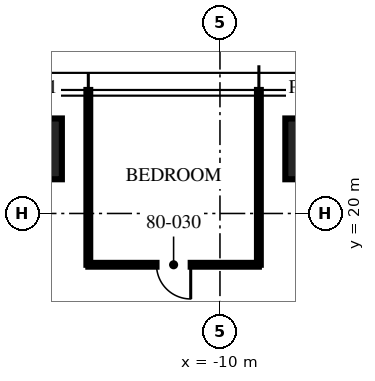
"""IFC4 building model, lengths in metres.
Left out: names, types, materials, properties, quantities, classifications, styles, units other than length and angle.
Written with IfcOpenShell. Run it as: python <this file> out.ifc"""

import sys

from ifc_helpers import new_model, si_unit, direction, frame, frame_2d, origin, origin_2d, place, context, subcontext, project, spatial, rectangle, extrude, element, fill, save


model = new_model("IFC4")
c1 = context("Model", 3, precision=1e-05, world=origin(), true_north=direction((0.0, 1.0)))
c2 = subcontext(c1, "Body", "Model", "MODEL_VIEW")
j1 = project(units=[si_unit("LENGTHUNIT", "METRE"), si_unit("PLANEANGLEUNIT", "RADIAN")], contexts=[c1])
p1 = place(None, origin())
s1 = spatial("IfcSite", under=j1, at=p1, CompositionType="ELEMENT")
p2 = place(p1, origin())
s2 = spatial("IfcBuilding", under=s1, at=p2, CompositionType="ELEMENT")
p3 = place(p2, frame((0.0, 0.0, 319.5)))
s3 = spatial("IfcBuildingStorey", under=s2, at=p3, CompositionType="ELEMENT", Elevation=319.5)
for number, where, z_axis, x_axis in (
    (1, (-14.96, 21.7, 0.0), (0.0, 0.0, 1.0), (1.0, 0.0, 0.0)),
    (2, (-7.48, 21.7, 0.0), (0.0, 0.0, 1.0), (1.0, 0.0, 0.0)),
):
    element("IfcColumn", number, at=place(p3, frame(where, z_axis=z_axis, x_axis=x_axis)), inside=s3, PredefinedType="COLUMN", context=c2, shape_type="SweptSolid", body=[
        extrude(rectangle(XDim=1.6, YDim=1.6, at=origin_2d()), origin(), (0.0, 0.0, 1.0), 3.75),
    ])
for number, where, z_axis, x_axis in (
    (3, (-8.976, 18.65, 0.0), (0.0, 0.0, 1.0), (0.0, 1.0, 0.0)),
    (4, (-13.464, 18.65, 0.0), (0.0, 0.0, 1.0), (0.0, 1.0, 0.0)),
):
    element("IfcWall", number, at=place(p3, frame(where, z_axis=z_axis, x_axis=x_axis)), inside=s3, PredefinedType="PARTITIONING", context=c2, shape_type="SweptSolid", body=[
        extrude(rectangle(XDim=4.6, YDim=0.1, at=frame_2d((2.3, 0.0))), origin(), (0.0, 0.0, 1.0), 3.01),
    ])
p4 = place(p3, frame((-8.976, 18.65, 0.0), z_axis=(0.0, 0.0, 1.0), x_axis=(-1.0, 0.0, 0.0)))
e5 = element("IfcWall", 5, at=p4, inside=s3, PredefinedType="PARTITIONING", context=c2, shape_type="SweptSolid", body=[
    extrude(rectangle(XDim=4.488, YDim=0.1, at=frame_2d((2.244, 0.0))), origin(), (0.0, 0.0, 1.0), 2.91),
])
p5 = place(p4, frame((1.794, 0.0, 0.0)))
e6 = element("IfcOpeningElement", 6, at=p5, cuts=e5, PredefinedType="OPENING", context=c2, shape_type="SweptSolid", body=[
    extrude(rectangle(XDim=0.9, YDim=2.1, at=frame_2d((0.45, 1.05))), frame((0.0, 0.06, 0.0), z_axis=(0.0, -1.0, 0.0), x_axis=(1.0, 0.0, 0.0)), (0.0, 0.0, 1.0), 0.12),
])
p6 = place(p5, origin())
e7 = element("IfcDoor", 7, at=p6, inside=s3, OperationType="SINGLE_SWING_LEFT", PredefinedType="DOOR", context=c2, shape_type="SweptSolid", body=[
    extrude(rectangle(XDim=0.9, YDim=2.1, at=frame_2d((0.45, 1.05))), frame((0.0, 0.025, 0.0), z_axis=(0.0, -1.0, 0.0), x_axis=(1.0, 0.0, 0.0)), (0.0, 0.0, 1.0), 0.05),
])
fill(e6, e7)
save(model, sys.argv[1])
